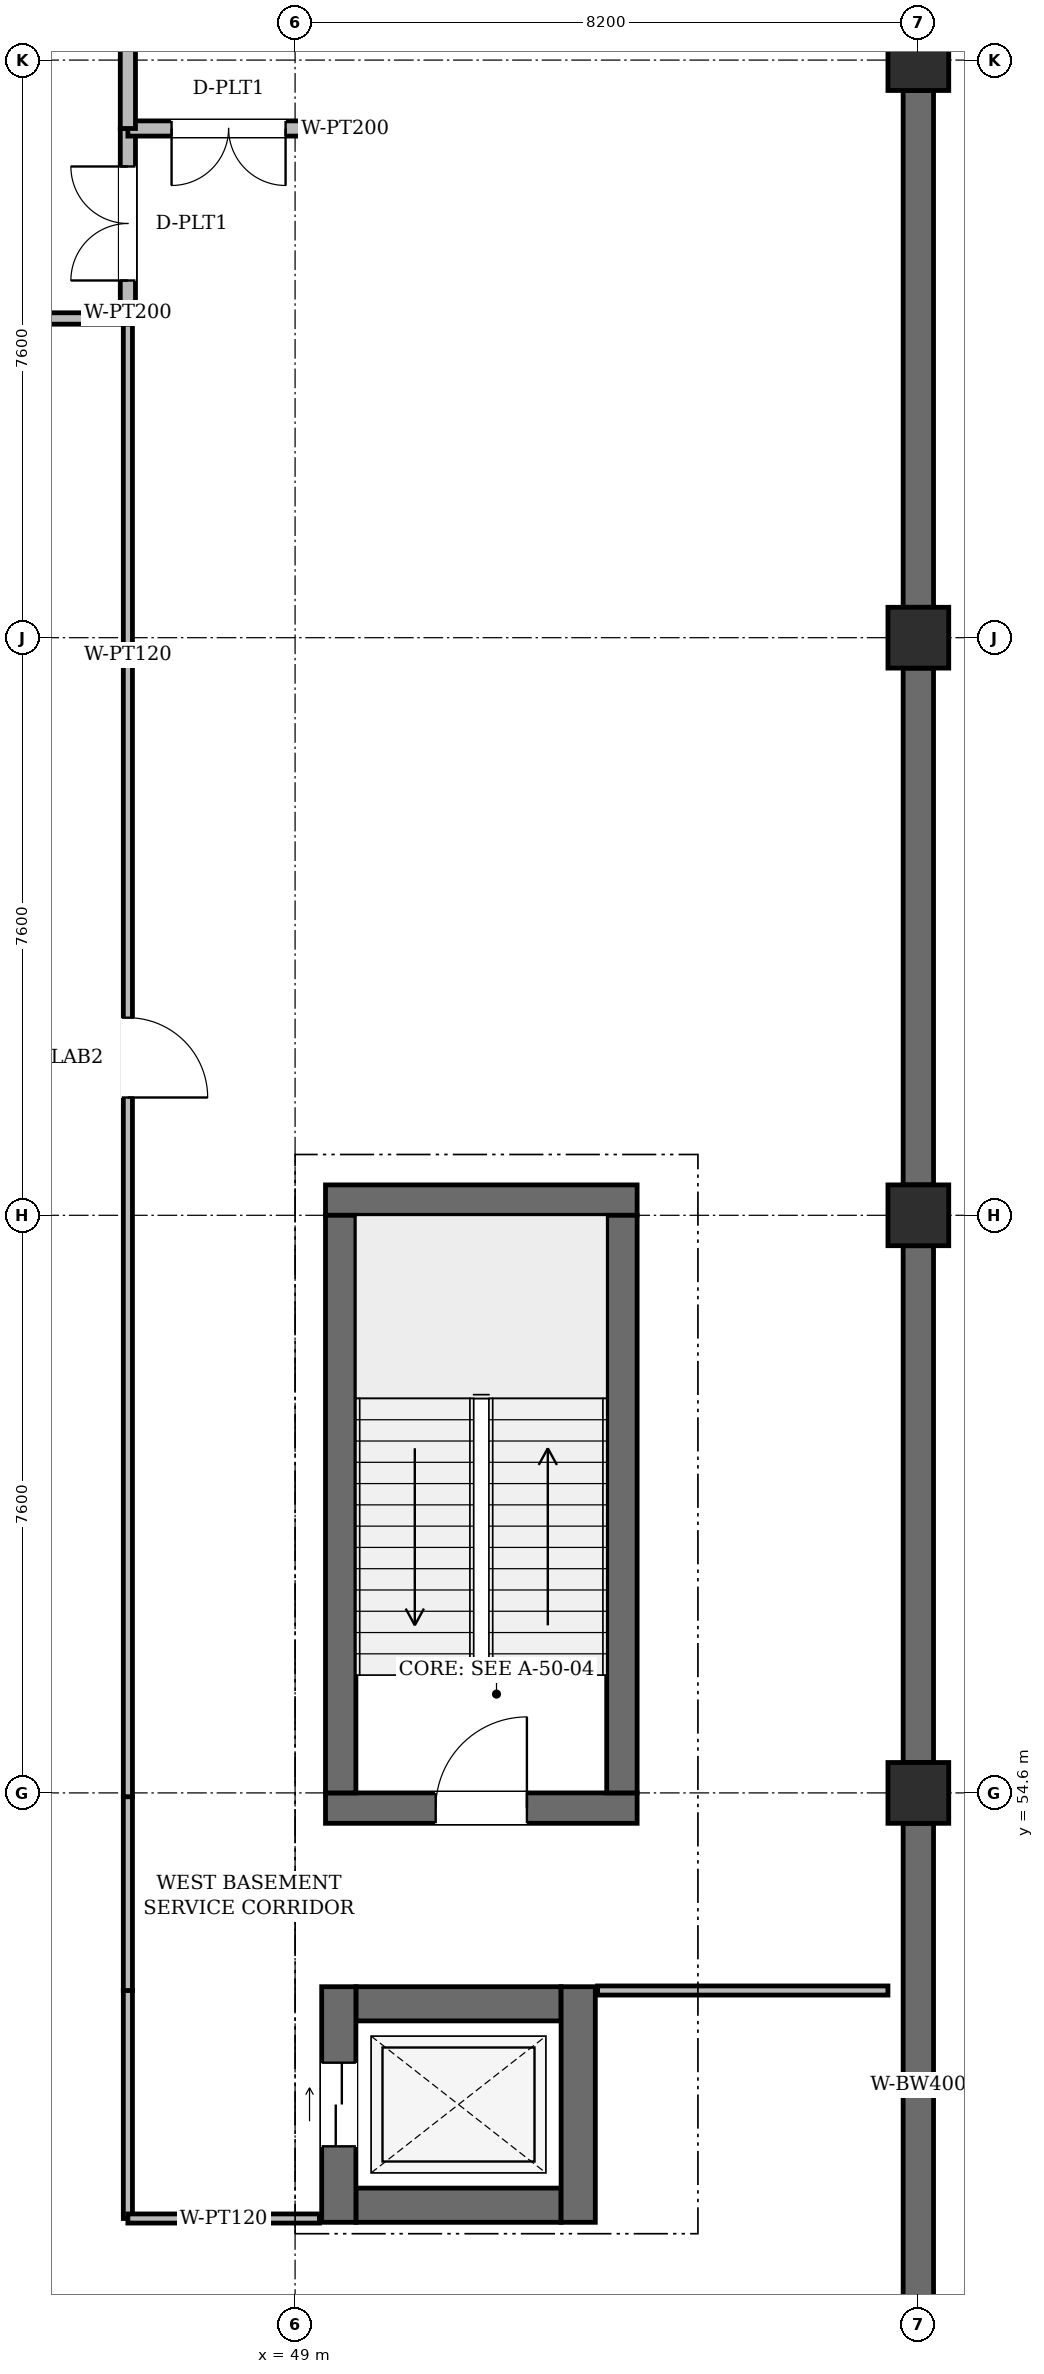
"""IFC4 building model, lengths in metres.
Left out: names, types, materials, properties, quantities, classifications, styles, units other than length and angle.
Written with IfcOpenShell. Run it as: python <this file> out.ifc"""

import sys

from ifc_helpers import new_model, si_unit, direction, frame, frame_2d, origin, origin_2d, place, context, subcontext, project, spatial, rectangle, circle, extrude, element, fill, save


model = new_model("IFC4")
c1 = context("Model", 3, precision=1e-05, world=origin(), true_north=direction((0.0, 1.0)))
c2 = subcontext(c1, "Body", "Model", "MODEL_VIEW")
j1 = project(units=[si_unit("LENGTHUNIT", "METRE"), si_unit("PLANEANGLEUNIT", "RADIAN")], contexts=[c1])
p1 = place(None, origin())
s1 = spatial("IfcSite", under=j1, at=p1, CompositionType="ELEMENT")
p2 = place(p1, origin())
s2 = spatial("IfcBuilding", under=s1, at=p2, CompositionType="ELEMENT")
p3 = place(p2, frame((0.0, 0.0, -4.8)))
s3 = spatial("IfcBuildingStorey", under=s2, at=p3, CompositionType="ELEMENT", Elevation=-4.8)
for number, where, z_axis, x_axis in (
    (1, (57.2, 54.6, 0.0), (0.0, 0.0, 1.0), (1.0, 0.0, 0.0)),
    (2, (57.2, 62.2, 0.0), (0.0, 0.0, 1.0), (1.0, 0.0, 0.0)),
    (3, (57.2, 69.8, 0.0), (0.0, 0.0, 1.0), (1.0, 0.0, 0.0)),
    (4, (57.2, 77.4, 0.0), (0.0, 0.0, 1.0), (1.0, 0.0, 0.0)),
):
    element("IfcColumn", number, at=place(p3, frame(where, z_axis=z_axis, x_axis=x_axis)), inside=s3, PredefinedType="COLUMN", context=c2, shape_type="SweptSolid", body=[
        extrude(circle(Radius=0.4, at=origin_2d()), origin(), (0.0, 0.0, 1.0), 4.46),
    ])
p4 = place(p3, frame((57.2, 47.325, 0.0), z_axis=(0.0, 0.0, 1.0), x_axis=(0.0, 1.0, 0.0)))
e5 = element("IfcWall", 5, at=p4, inside=s3, PredefinedType="SOLIDWALL", context=c2, shape_type="SweptSolid", body=[
    extrude(rectangle(XDim=6.875, YDim=0.4, at=frame_2d((3.438, 0.0))), origin(), (0.0, 0.0, 1.0), 4.46),
])
p5 = place(p3, frame((57.2, 55.0, 0.0), z_axis=(0.0, 0.0, 1.0), x_axis=(0.0, 1.0, 0.0)))
e6 = element("IfcWall", 6, at=p5, inside=s3, PredefinedType="SOLIDWALL", context=c2, shape_type="SweptSolid", body=[
    extrude(rectangle(XDim=6.8, YDim=0.4, at=frame_2d((3.4, 0.0))), origin(), (0.0, 0.0, 1.0), 4.46),
])
p6 = place(p3, frame((57.2, 62.6, 0.0), z_axis=(0.0, 0.0, 1.0), x_axis=(0.0, 1.0, 0.0)))
e7 = element("IfcWall", 7, at=p6, inside=s3, PredefinedType="SOLIDWALL", context=c2, shape_type="SweptSolid", body=[
    extrude(rectangle(XDim=6.8, YDim=0.4, at=frame_2d((3.4, 0.0))), origin(), (0.0, 0.0, 1.0), 4.46),
])
p7 = place(p3, frame((57.2, 70.2, 0.0), z_axis=(0.0, 0.0, 1.0), x_axis=(0.0, 1.0, 0.0)))
e8 = element("IfcWall", 8, at=p7, inside=s3, PredefinedType="SOLIDWALL", context=c2, shape_type="SweptSolid", body=[
    extrude(rectangle(XDim=6.8, YDim=0.4, at=frame_2d((3.4, 0.0))), origin(), (0.0, 0.0, 1.0), 4.46),
])
p8 = place(p3, frame((49.4, 54.4, 0.0), z_axis=(0.0, 0.0, 1.0), x_axis=(1.0, 0.0, 0.0)))
e9 = element("IfcWall", 9, at=p8, inside=s3, PredefinedType="SHEAR", context=c2, shape_type="SweptSolid", body=[
    extrude(rectangle(XDim=4.1, YDim=0.4, at=frame_2d((2.05, 0.0))), origin(), (0.0, 0.0, 1.0), 4.46),
])
p9 = place(p8, frame((1.45, 0.0, 0.0)))
e10 = element("IfcOpeningElement", 10, at=p9, cuts=e9, PredefinedType="OPENING", context=c2, shape_type="SweptSolid", body=[
    extrude(rectangle(XDim=1.2, YDim=2.2, at=frame_2d((0.6, 1.1))), frame((0.0, 0.212, 0.0), z_axis=(0.0, -1.0, 0.0), x_axis=(1.0, 0.0, 0.0)), (0.0, 0.0, 1.0), 0.424),
])
p10 = place(p3, frame((49.4, 62.4, 0.0), z_axis=(0.0, 0.0, 1.0), x_axis=(1.0, 0.0, 0.0)))
e11 = element("IfcWall", 11, at=p10, inside=s3, PredefinedType="SHEAR", context=c2, shape_type="SweptSolid", body=[
    extrude(rectangle(XDim=4.1, YDim=0.4, at=frame_2d((2.05, 0.0))), origin(), (0.0, 0.0, 1.0), 4.46),
])
for number, where, z_axis, x_axis in (
    (12, (49.6, 54.6, 0.0), (0.0, 0.0, 1.0), (0.0, 1.0, 0.0)),
    (13, (53.3, 54.6, 0.0), (0.0, 0.0, 1.0), (0.0, 1.0, 0.0)),
):
    element("IfcWall", number, at=place(p3, frame(where, z_axis=z_axis, x_axis=x_axis)), inside=s3, PredefinedType="SHEAR", context=c2, shape_type="SweptSolid", body=[
        extrude(rectangle(XDim=7.6, YDim=0.4, at=frame_2d((3.8, 0.0))), origin(), (0.0, 0.0, 1.0), 4.46),
    ])
for number, where, z_axis, x_axis in (
    (14, (49.8, 49.175, 0.0), (0.0, 0.0, 1.0), (1.0, 0.0, 0.0)),
    (15, (49.8, 51.825, 0.0), (0.0, 0.0, 1.0), (1.0, 0.0, 0.0)),
):
    element("IfcWall", number, at=place(p3, frame(where, z_axis=z_axis, x_axis=x_axis)), inside=s3, PredefinedType="SHEAR", context=c2, shape_type="SweptSolid", body=[
        extrude(rectangle(XDim=2.7, YDim=0.45, at=frame_2d((1.35, 0.0))), origin(), (0.0, 0.0, 1.0), 4.46),
    ])
p11 = place(p3, frame((49.575, 48.95, 0.0), z_axis=(0.0, 0.0, 1.0), x_axis=(0.0, 1.0, 0.0)))
e16 = element("IfcWall", 16, at=p11, inside=s3, PredefinedType="SHEAR", context=c2, shape_type="SweptSolid", body=[
    extrude(rectangle(XDim=3.1, YDim=0.45, at=frame_2d((1.55, 0.0))), origin(), (0.0, 0.0, 1.0), 4.46),
])
p12 = place(p11, frame((1.0, 0.0, 0.0)))
e17 = element("IfcOpeningElement", 17, at=p12, cuts=e16, PredefinedType="OPENING", context=c2, shape_type="SweptSolid", body=[
    extrude(rectangle(XDim=1.1, YDim=2.2, at=frame_2d((0.55, 1.1))), frame((0.0, 0.237, 0.0), z_axis=(0.0, -1.0, 0.0), x_axis=(1.0, 0.0, 0.0)), (0.0, 0.0, 1.0), 0.474),
])
p13 = place(p3, frame((52.725, 48.95, 0.0), z_axis=(0.0, 0.0, 1.0), x_axis=(0.0, 1.0, 0.0)))
e18 = element("IfcWall", 18, at=p13, inside=s3, PredefinedType="SHEAR", context=c2, shape_type="SweptSolid", body=[
    extrude(rectangle(XDim=3.1, YDim=0.45, at=frame_2d((1.55, 0.0))), origin(), (0.0, 0.0, 1.0), 4.46),
])
p14 = place(p3, frame((46.8, 49.0, 0.0), z_axis=(0.0, 0.0, 1.0), x_axis=(0.0, 1.0, 0.0)))
e19 = element("IfcWall", 19, at=p14, inside=s3, PredefinedType="PARTITIONING", context=c2, shape_type="SweptSolid", body=[
    extrude(rectangle(XDim=3.0, YDim=0.12, at=frame_2d((1.5, 0.0))), origin(), (0.0, 0.0, 1.0), 4.405),
])
p15 = place(p3, frame((46.8, 52.0, 0.0), z_axis=(0.0, 0.0, 1.0), x_axis=(0.0, 1.0, 0.0)))
e20 = element("IfcWall", 20, at=p15, inside=s3, PredefinedType="PARTITIONING", context=c2, shape_type="SweptSolid", body=[
    extrude(rectangle(XDim=2.55, YDim=0.12, at=frame_2d((1.275, 0.0))), origin(), (0.0, 0.0, 1.0), 4.405),
])
p16 = place(p3, frame((46.8, 54.55, 0.0), z_axis=(0.0, 0.0, 1.0), x_axis=(0.0, 1.0, 0.0)))
e21 = element("IfcWall", 21, at=p16, inside=s3, PredefinedType="PARTITIONING", context=c2, shape_type="SweptSolid", body=[
    extrude(rectangle(XDim=19.45, YDim=0.12, at=frame_2d((9.725, 0.0))), origin(), (0.0, 0.0, 1.0), 4.405),
])
p17 = place(p16, frame((9.2, 0.0, 0.0)))
e22 = element("IfcOpeningElement", 22, at=p17, cuts=e21, PredefinedType="OPENING", context=c2, shape_type="SweptSolid", body=[
    extrude(rectangle(XDim=1.05, YDim=2.2, at=frame_2d((0.525, 1.1))), frame((0.0, 0.072, 0.0), z_axis=(0.0, -1.0, 0.0), x_axis=(1.0, 0.0, 0.0)), (0.0, 0.0, 1.0), 0.144),
])
p18 = place(p3, frame((56.8, 52.0, 0.0), z_axis=(0.0, 0.0, 1.0), x_axis=(-1.0, 0.0, 0.0)))
e23 = element("IfcWall", 23, at=p18, inside=s3, PredefinedType="PARTITIONING", context=c2, shape_type="SweptSolid", body=[
    extrude(rectangle(XDim=3.82, YDim=0.12, at=frame_2d((1.91, 0.0))), origin(), (0.0, 0.0, 1.0), 4.405),
])
p19 = place(p3, frame((49.32, 49.0, 0.0), z_axis=(0.0, 0.0, 1.0), x_axis=(-1.0, 0.0, 0.0)))
e24 = element("IfcWall", 24, at=p19, inside=s3, PredefinedType="PARTITIONING", context=c2, shape_type="SweptSolid", body=[
    extrude(rectangle(XDim=2.52, YDim=0.12, at=frame_2d((1.26, 0.0))), origin(), (0.0, 0.0, 1.0), 4.405),
])
p20 = place(p3, frame((46.8, 74.0, 0.0), z_axis=(0.0, 0.0, 1.0), x_axis=(0.0, 1.0, 0.0)))
e25 = element("IfcWall", 25, at=p20, inside=s3, PredefinedType="PARTITIONING", context=c2, shape_type="SweptSolid", body=[
    extrude(rectangle(XDim=2.5, YDim=0.2, at=frame_2d((1.25, 0.0))), origin(), (0.0, 0.0, 1.0), 4.405),
])
p21 = place(p20, frame((0.5, 0.0, 0.0)))
e26 = element("IfcOpeningElement", 26, at=p21, cuts=e25, PredefinedType="OPENING", context=c2, shape_type="SweptSolid", body=[
    extrude(rectangle(XDim=1.5, YDim=2.2, at=frame_2d((0.75, 1.1))), frame((0.0, 0.112, 0.0), z_axis=(0.0, -1.0, 0.0), x_axis=(1.0, 0.0, 0.0)), (0.0, 0.0, 1.0), 0.224),
])
p22 = place(p3, frame((46.8, 76.5, 0.0), z_axis=(0.0, 0.0, 1.0), x_axis=(1.0, 0.0, 0.0)))
e27 = element("IfcWall", 27, at=p22, inside=s3, PredefinedType="PARTITIONING", context=c2, shape_type="SweptSolid", body=[
    extrude(rectangle(XDim=2.65, YDim=0.2, at=frame_2d((1.325, 0.0))), origin(), (0.0, 0.0, 1.0), 4.405),
])
p23 = place(p22, frame((0.575, 0.0, 0.0)))
e28 = element("IfcOpeningElement", 28, at=p23, cuts=e27, PredefinedType="OPENING", context=c2, shape_type="SweptSolid", body=[
    extrude(rectangle(XDim=1.5, YDim=2.2, at=frame_2d((0.75, 1.1))), frame((0.0, 0.112, 0.0), z_axis=(0.0, -1.0, 0.0), x_axis=(1.0, 0.0, 0.0)), (0.0, 0.0, 1.0), 0.224),
])
p24 = place(p3, frame((24.8, 74.0, 0.0), z_axis=(0.0, 0.0, 1.0), x_axis=(1.0, 0.0, 0.0)))
e29 = element("IfcWall", 29, at=p24, inside=s3, PredefinedType="PARTITIONING", context=c2, shape_type="SweptSolid", body=[
    extrude(rectangle(XDim=22.0, YDim=0.15, at=frame_2d((11.0, 0.0))), origin(), (0.0, 0.0, 1.0), 4.405),
])
p25 = place(p3, frame((46.8, 99.8, 0.0), z_axis=(0.0, 0.0, 1.0), x_axis=(0.0, -1.0, 0.0)))
e30 = element("IfcWall", 30, at=p25, inside=s3, PredefinedType="PARTITIONING", context=c2, shape_type="SweptSolid", body=[
    extrude(rectangle(XDim=23.3, YDim=0.2, at=frame_2d((11.65, 0.0))), origin(), (0.0, 0.0, 1.0), 4.405),
])
p26 = place(p9, origin())
e31 = element("IfcDoor", 31, at=p26, inside=s3, OperationType="SINGLE_SWING_RIGHT", PredefinedType="DOOR", context=c2, shape_type="SweptSolid", body=[
    extrude(rectangle(XDim=1.2, YDim=2.2, at=frame_2d((0.6, 1.1))), frame((0.0, 0.025, 0.0), z_axis=(0.0, -1.0, 0.0), x_axis=(1.0, 0.0, 0.0)), (0.0, 0.0, 1.0), 0.05),
])
fill(e10, e31)
p27 = place(p12, origin())
e32 = element("IfcDoor", 32, at=p27, inside=s3, OperationType="DOUBLE_DOOR_SLIDING", PredefinedType="DOOR", context=c2, shape_type="SweptSolid", body=[
    extrude(rectangle(XDim=1.1, YDim=2.2, at=frame_2d((0.55, 1.1))), frame((0.0, 0.025, 0.0), z_axis=(0.0, -1.0, 0.0), x_axis=(1.0, 0.0, 0.0)), (0.0, 0.0, 1.0), 0.05),
])
fill(e17, e32)
p28 = place(p17, frame((1.05, 0.0, 0.0), z_axis=(0.0, 0.0, 1.0), x_axis=(-1.0, 0.0, 0.0)))
e33 = element("IfcDoor", 33, at=p28, inside=s3, OperationType="SINGLE_SWING_RIGHT", PredefinedType="DOOR", context=c2, shape_type="SweptSolid", body=[
    extrude(rectangle(XDim=1.05, YDim=2.2, at=frame_2d((0.525, 1.1))), frame((0.0, 0.025, 0.0), z_axis=(0.0, -1.0, 0.0), x_axis=(1.0, 0.0, 0.0)), (0.0, 0.0, 1.0), 0.05),
])
fill(e22, e33)
p29 = place(p21, origin())
e34 = element("IfcDoor", 34, at=p29, inside=s3, OperationType="DOUBLE_DOOR_SINGLE_SWING", PredefinedType="DOOR", context=c2, shape_type="SweptSolid", body=[
    extrude(rectangle(XDim=1.5, YDim=2.2, at=frame_2d((0.75, 1.1))), frame((0.0, 0.025, 0.0), z_axis=(0.0, -1.0, 0.0), x_axis=(1.0, 0.0, 0.0)), (0.0, 0.0, 1.0), 0.05),
])
fill(e26, e34)
p30 = place(p23, frame((1.5, 0.0, 0.0), z_axis=(0.0, 0.0, 1.0), x_axis=(-1.0, 0.0, 0.0)))
e35 = element("IfcDoor", 35, at=p30, inside=s3, OperationType="DOUBLE_DOOR_SINGLE_SWING", PredefinedType="DOOR", context=c2, shape_type="SweptSolid", body=[
    extrude(rectangle(XDim=1.5, YDim=2.2, at=frame_2d((0.75, 1.1))), frame((0.0, 0.025, 0.0), z_axis=(0.0, -1.0, 0.0), x_axis=(1.0, 0.0, 0.0)), (0.0, 0.0, 1.0), 0.05),
])
fill(e28, e35)
save(model, sys.argv[1])
